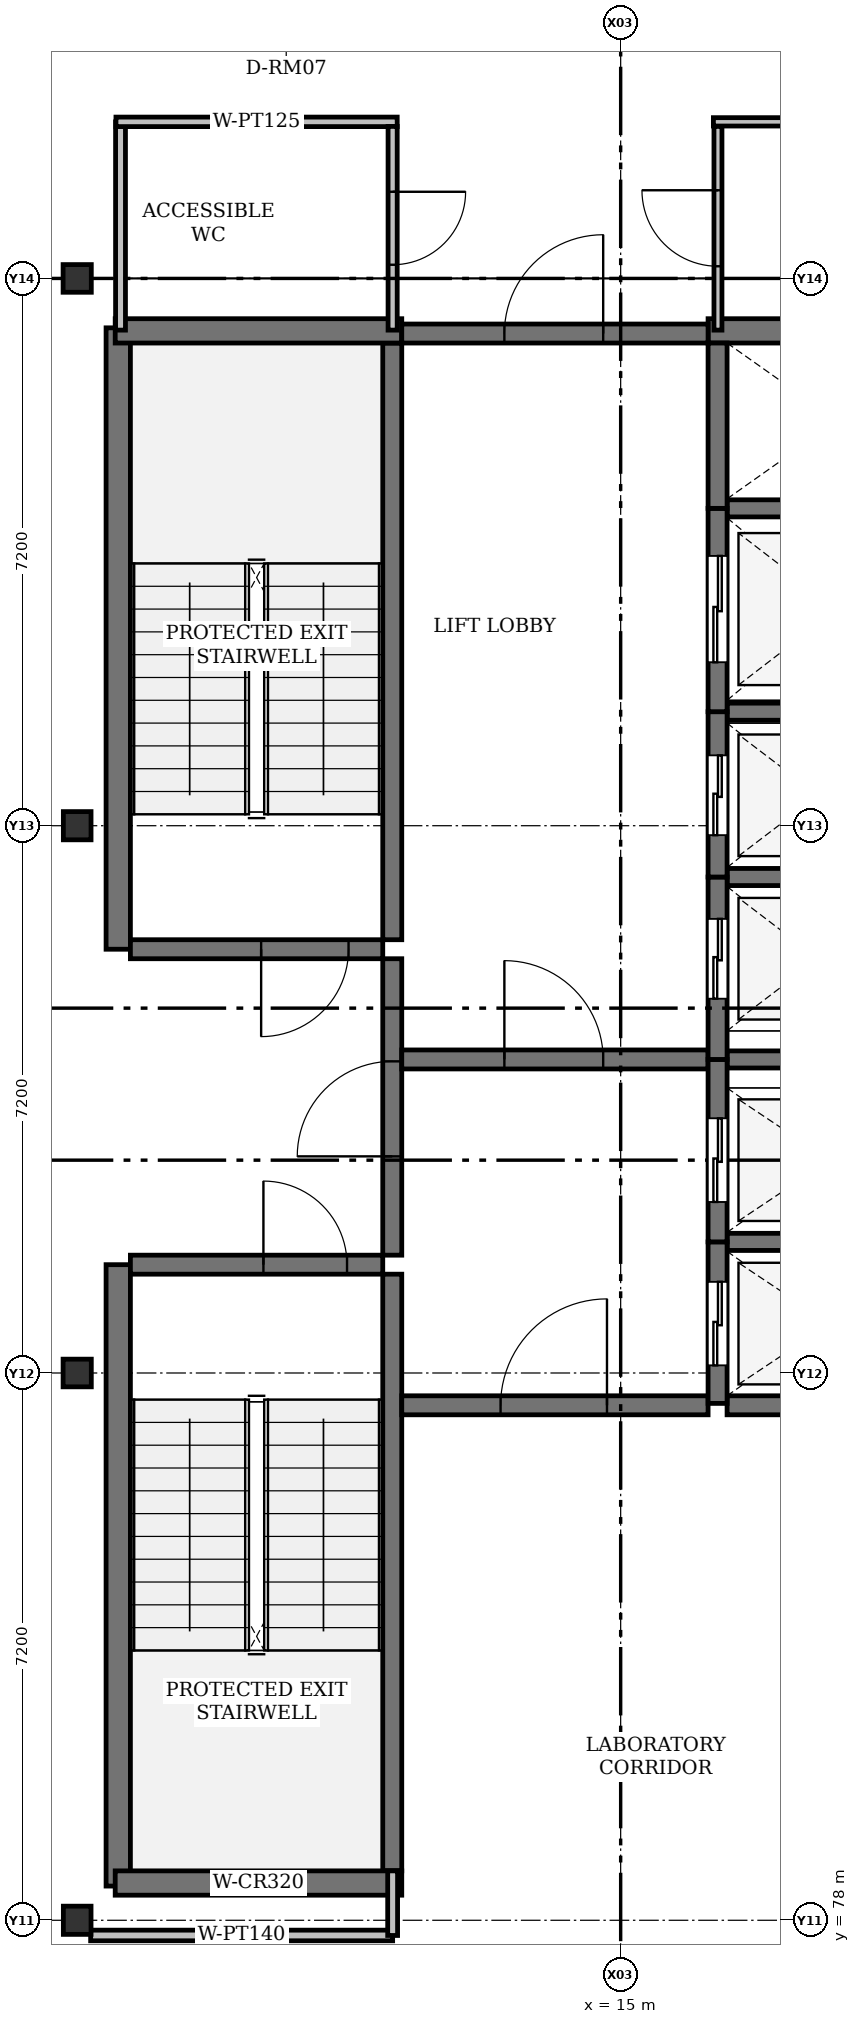
"""IFC4 building model, lengths in metres.
Left out: names, types, materials, properties, quantities, classifications, styles, units other than length and angle.
Written with IfcOpenShell. Run it as: python <this file> out.ifc"""

import sys

from ifc_helpers import new_model, si_unit, direction, frame, frame_2d, origin, origin_2d, place, context, subcontext, project, spatial, rectangle, i_section, extrude, element, fill, save


model = new_model("IFC4")
c1 = context("Model", 3, precision=1e-05, world=origin(), true_north=direction((0.0, 1.0)))
c2 = subcontext(c1, "Body", "Model", "MODEL_VIEW")
j1 = project(units=[si_unit("LENGTHUNIT", "METRE"), si_unit("PLANEANGLEUNIT", "RADIAN")], contexts=[c1])
p1 = place(None, origin())
s1 = spatial("IfcSite", under=j1, at=p1, CompositionType="ELEMENT")
p2 = place(p1, origin())
s2 = spatial("IfcBuilding", under=s1, at=p2, CompositionType="ELEMENT")
p3 = place(p2, frame((0.0, 0.0, 39.3)))
s3 = spatial("IfcBuildingStorey", under=s2, at=p3, CompositionType="ELEMENT", Elevation=39.3)
for number, where, z_axis, x_axis in (
    (1, (7.85, 78.0, 0.0), (0.0, 0.0, 1.0), (0.0, 1.0, 0.0)),
    (2, (7.85, 85.2, 0.0), (0.0, 0.0, 1.0), (1.0, 0.0, 0.0)),
    (3, (7.85, 92.4, 0.0), (0.0, 0.0, 1.0), (0.0, 1.0, 0.0)),
    (4, (7.85, 99.6, 0.0), (0.0, 0.0, 1.0), (1.0, 0.0, 0.0)),
):
    element("IfcColumn", number, at=place(p3, frame(where, z_axis=z_axis, x_axis=x_axis)), inside=s3, PredefinedType="COLUMN", context=c2, shape_type="SweptSolid", body=[
        extrude(i_section(OverallWidth=0.371, OverallDepth=0.364, WebThickness=0.013, FlangeThickness=0.022, FilletRadius=0.015, at=origin_2d()), origin(), (0.0, 0.0, 1.0), 4.2),
    ])
for number, where, z_axis, x_axis in (
    (5, (8.39, 78.45, 0.0), (0.0, 0.0, 1.0), (0.0, 1.0, 0.0)),
    (6, (8.39, 90.775, 0.0), (0.0, 0.0, 1.0), (0.0, 1.0, 0.0)),
):
    element("IfcWall", number, at=place(p3, frame(where, z_axis=z_axis, x_axis=x_axis)), inside=s3, PredefinedType="SHEAR", context=c2, shape_type="SweptSolid", body=[
        extrude(rectangle(XDim=8.175, YDim=0.32, at=frame_2d((4.087, 0.0))), origin(), (0.0, 0.0, 1.0), 4.2),
    ])
for number, where, z_axis, x_axis in (
    (7, (11.995, 78.65, 0.0), (0.0, 0.0, 1.0), (0.0, 1.0, 0.0)),
    (8, (11.995, 90.9, 0.0), (0.0, 0.0, 1.0), (0.0, 1.0, 0.0)),
):
    element("IfcWall", number, at=place(p3, frame(where, z_axis=z_axis, x_axis=x_axis)), inside=s3, PredefinedType="SHEAR", context=c2, shape_type="SweptSolid", body=[
        extrude(rectangle(XDim=7.85, YDim=0.25, at=frame_2d((3.925, 0.0))), origin(), (0.0, 0.0, 1.0), 4.2),
    ])
p4 = place(p3, frame((11.995, 86.75, 0.0), z_axis=(0.0, 0.0, 1.0), x_axis=(0.0, 1.0, 0.0)))
e9 = element("IfcWall", 9, at=p4, inside=s3, PredefinedType="SHEAR", context=c2, shape_type="SweptSolid", body=[
    extrude(rectangle(XDim=3.9, YDim=0.25, at=frame_2d((1.95, 0.0))), origin(), (0.0, 0.0, 1.0), 4.2),
])
p5 = place(p4, frame((1.3, 0.0, 0.0)))
e10 = element("IfcOpeningElement", 10, at=p5, cuts=e9, PredefinedType="OPENING", context=c2, shape_type="SweptSolid", body=[
    extrude(rectangle(XDim=1.25, YDim=2.2, at=frame_2d((0.625, 1.1))), frame((0.0, 0.125, 0.0), z_axis=(0.0, -1.0, 0.0), x_axis=(1.0, 0.0, 0.0)), (0.0, 0.0, 1.0), 0.25),
])
for number, where, z_axis, x_axis in (
    (11, (8.35, 78.49, 0.0), (0.0, 0.0, 1.0), (1.0, 0.0, 0.0)),
    (12, (8.35, 98.91, 0.0), (0.0, 0.0, 1.0), (1.0, 0.0, 0.0)),
):
    element("IfcWall", number, at=place(p3, frame(where, z_axis=z_axis, x_axis=x_axis)), inside=s3, PredefinedType="SHEAR", context=c2, shape_type="SweptSolid", body=[
        extrude(rectangle(XDim=3.77, YDim=0.32, at=frame_2d((1.885, 0.0))), origin(), (0.0, 0.0, 1.0), 4.2),
    ])
p6 = place(p3, frame((16.15, 98.91, 0.0), z_axis=(0.0, 0.0, 1.0), x_axis=(1.0, 0.0, 0.0)))
e13 = element("IfcWall", 13, at=p6, inside=s3, PredefinedType="SHEAR", context=c2, shape_type="SweptSolid", body=[
    extrude(rectangle(XDim=3.3, YDim=0.32, at=frame_2d((1.65, 0.0))), origin(), (0.0, 0.0, 1.0), 4.2),
])
p7 = place(p3, frame((12.12, 98.875, 0.0), z_axis=(0.0, 0.0, 1.0), x_axis=(1.0, 0.0, 0.0)))
e14 = element("IfcWall", 14, at=p7, inside=s3, PredefinedType="SHEAR", context=c2, shape_type="SweptSolid", body=[
    extrude(rectangle(XDim=4.03, YDim=0.25, at=frame_2d((2.015, 0.0))), origin(), (0.0, 0.0, 1.0), 4.2),
])
p8 = place(p7, frame((1.35, 0.0, 0.0)))
e15 = element("IfcOpeningElement", 15, at=p8, cuts=e14, PredefinedType="OPENING", context=c2, shape_type="SweptSolid", body=[
    extrude(rectangle(XDim=1.3, YDim=2.2, at=frame_2d((0.65, 1.1))), frame((0.0, 0.125, 0.0), z_axis=(0.0, -1.0, 0.0), x_axis=(1.0, 0.0, 0.0)), (0.0, 0.0, 1.0), 0.25),
])
p9 = place(p3, frame((8.55, 86.625, 0.0), z_axis=(0.0, 0.0, 1.0), x_axis=(1.0, 0.0, 0.0)))
e16 = element("IfcWall", 16, at=p9, inside=s3, PredefinedType="SHEAR", context=c2, shape_type="SweptSolid", body=[
    extrude(rectangle(XDim=3.32, YDim=0.25, at=frame_2d((1.66, 0.0))), origin(), (0.0, 0.0, 1.0), 4.2),
])
p10 = place(p9, frame((1.75, 0.0, 0.0)))
e17 = element("IfcOpeningElement", 17, at=p10, cuts=e16, PredefinedType="OPENING", context=c2, shape_type="SweptSolid", body=[
    extrude(rectangle(XDim=1.1, YDim=2.15, at=frame_2d((0.55, 1.075))), frame((0.0, 0.125, 0.0), z_axis=(0.0, -1.0, 0.0), x_axis=(1.0, 0.0, 0.0)), (0.0, 0.0, 1.0), 0.25),
])
p11 = place(p3, frame((11.87, 90.775, 0.0), z_axis=(0.0, 0.0, 1.0), x_axis=(-1.0, 0.0, 0.0)))
e18 = element("IfcWall", 18, at=p11, inside=s3, PredefinedType="SHEAR", context=c2, shape_type="SweptSolid", body=[
    extrude(rectangle(XDim=3.32, YDim=0.25, at=frame_2d((1.66, 0.0))), origin(), (0.0, 0.0, 1.0), 4.2),
])
p12 = place(p11, frame((0.45, 0.0, 0.0)))
e19 = element("IfcOpeningElement", 19, at=p12, cuts=e18, PredefinedType="OPENING", context=c2, shape_type="SweptSolid", body=[
    extrude(rectangle(XDim=1.15, YDim=2.15, at=frame_2d((0.575, 1.075))), frame((0.0, 0.125, 0.0), z_axis=(0.0, -1.0, 0.0), x_axis=(1.0, 0.0, 0.0)), (0.0, 0.0, 1.0), 0.25),
])
p13 = place(p3, frame((12.12, 89.325, 0.0), z_axis=(0.0, 0.0, 1.0), x_axis=(1.0, 0.0, 0.0)))
e20 = element("IfcWall", 20, at=p13, inside=s3, PredefinedType="SHEAR", context=c2, shape_type="SweptSolid", body=[
    extrude(rectangle(XDim=4.03, YDim=0.25, at=frame_2d((2.015, 0.0))), origin(), (0.0, 0.0, 1.0), 4.2),
])
p14 = place(p13, frame((1.35, 0.0, 0.0)))
e21 = element("IfcOpeningElement", 21, at=p14, cuts=e20, PredefinedType="OPENING", context=c2, shape_type="SweptSolid", body=[
    extrude(rectangle(XDim=1.3, YDim=2.2, at=frame_2d((0.65, 1.1))), frame((0.0, 0.125, 0.0), z_axis=(0.0, -1.0, 0.0), x_axis=(1.0, 0.0, 0.0)), (0.0, 0.0, 1.0), 0.25),
])
p15 = place(p3, frame((12.12, 84.775, 0.0), z_axis=(0.0, 0.0, 1.0), x_axis=(1.0, 0.0, 0.0)))
e22 = element("IfcWall", 22, at=p15, inside=s3, PredefinedType="SHEAR", context=c2, shape_type="SweptSolid", body=[
    extrude(rectangle(XDim=4.03, YDim=0.25, at=frame_2d((2.015, 0.0))), origin(), (0.0, 0.0, 1.0), 4.2),
])
p16 = place(p15, frame((1.3, 0.0, 0.0)))
e23 = element("IfcOpeningElement", 23, at=p16, cuts=e22, PredefinedType="OPENING", context=c2, shape_type="SweptSolid", body=[
    extrude(rectangle(XDim=1.4, YDim=2.25, at=frame_2d((0.7, 1.125))), frame((0.0, 0.125, 0.0), z_axis=(0.0, -1.0, 0.0), x_axis=(1.0, 0.0, 0.0)), (0.0, 0.0, 1.0), 0.25),
])
p17 = place(p3, frame((16.4, 84.775, 0.0), z_axis=(0.0, 0.0, 1.0), x_axis=(1.0, 0.0, 0.0)))
e24 = element("IfcWall", 24, at=p17, inside=s3, PredefinedType="SHEAR", context=c2, shape_type="SweptSolid", body=[
    extrude(rectangle(XDim=2.95, YDim=0.25, at=frame_2d((1.475, 0.0))), origin(), (0.0, 0.0, 1.0), 4.2),
])
for number, where, z_axis, x_axis in (
    (25, (16.4, 86.925, 0.0), (0.0, 0.0, 1.0), (1.0, 0.0, 0.0)),
    (26, (16.4, 89.325, 0.0), (0.0, 0.0, 1.0), (1.0, 0.0, 0.0)),
    (27, (16.4, 91.725, 0.0), (0.0, 0.0, 1.0), (1.0, 0.0, 0.0)),
    (28, (16.4, 93.9, 0.0), (0.0, 0.0, 1.0), (1.0, 0.0, 0.0)),
    (29, (16.4, 96.575, 0.0), (0.0, 0.0, 1.0), (1.0, 0.0, 0.0)),
):
    element("IfcWall", number, at=place(p3, frame(where, z_axis=z_axis, x_axis=x_axis)), inside=s3, PredefinedType="SHEAR", context=c2, shape_type="SweptSolid", body=[
        extrude(rectangle(XDim=2.8, YDim=0.225, at=frame_2d((1.4, 0.0))), origin(), (0.0, 0.0, 1.0), 4.2),
    ])
p18 = place(p3, frame((16.275, 84.8, 0.0), z_axis=(0.0, 0.0, 1.0), x_axis=(0.0, 1.0, 0.0)))
e30 = element("IfcWall", 30, at=p18, inside=s3, PredefinedType="SHEAR", context=c2, shape_type="SweptSolid", body=[
    extrude(rectangle(XDim=2.125, YDim=0.25, at=frame_2d((1.062, 0.0))), origin(), (0.0, 0.0, 1.0), 4.2),
])
p19 = place(p18, frame((0.5, 0.0, 0.0)))
e31 = element("IfcOpeningElement", 31, at=p19, cuts=e30, PredefinedType="OPENING", context=c2, shape_type="SweptSolid", body=[
    extrude(rectangle(XDim=1.1, YDim=2.15, at=frame_2d((0.55, 1.075))), frame((0.0, 0.125, 0.0), z_axis=(0.0, -1.0, 0.0), x_axis=(1.0, 0.0, 0.0)), (0.0, 0.0, 1.0), 0.25),
])
p20 = place(p3, frame((16.275, 86.925, 0.0), z_axis=(0.0, 0.0, 1.0), x_axis=(0.0, 1.0, 0.0)))
e32 = element("IfcWall", 32, at=p20, inside=s3, PredefinedType="SHEAR", context=c2, shape_type="SweptSolid", body=[
    extrude(rectangle(XDim=2.4, YDim=0.25, at=frame_2d((1.2, 0.0))), origin(), (0.0, 0.0, 1.0), 4.2),
])
p21 = place(p20, frame((0.525, 0.0, 0.0)))
e33 = element("IfcOpeningElement", 33, at=p21, cuts=e32, PredefinedType="OPENING", context=c2, shape_type="SweptSolid", body=[
    extrude(rectangle(XDim=1.1, YDim=2.15, at=frame_2d((0.55, 1.075))), frame((0.0, 0.125, 0.0), z_axis=(0.0, -1.0, 0.0), x_axis=(1.0, 0.0, 0.0)), (0.0, 0.0, 1.0), 0.25),
])
p22 = place(p3, frame((16.275, 89.325, 0.0), z_axis=(0.0, 0.0, 1.0), x_axis=(0.0, 1.0, 0.0)))
e34 = element("IfcWall", 34, at=p22, inside=s3, PredefinedType="SHEAR", context=c2, shape_type="SweptSolid", body=[
    extrude(rectangle(XDim=2.4, YDim=0.25, at=frame_2d((1.2, 0.0))), origin(), (0.0, 0.0, 1.0), 4.2),
])
p23 = place(p22, frame((0.8, 0.0, 0.0)))
e35 = element("IfcOpeningElement", 35, at=p23, cuts=e34, PredefinedType="OPENING", context=c2, shape_type="SweptSolid", body=[
    extrude(rectangle(XDim=1.05, YDim=2.15, at=frame_2d((0.525, 1.075))), frame((0.0, 0.125, 0.0), z_axis=(0.0, -1.0, 0.0), x_axis=(1.0, 0.0, 0.0)), (0.0, 0.0, 1.0), 0.25),
])
p24 = place(p3, frame((16.275, 91.725, 0.0), z_axis=(0.0, 0.0, 1.0), x_axis=(0.0, 1.0, 0.0)))
e36 = element("IfcWall", 36, at=p24, inside=s3, PredefinedType="SHEAR", context=c2, shape_type="SweptSolid", body=[
    extrude(rectangle(XDim=2.175, YDim=0.25, at=frame_2d((1.087, 0.0))), origin(), (0.0, 0.0, 1.0), 4.2),
])
p25 = place(p24, frame((0.55, 0.0, 0.0)))
e37 = element("IfcOpeningElement", 37, at=p25, cuts=e36, PredefinedType="OPENING", context=c2, shape_type="SweptSolid", body=[
    extrude(rectangle(XDim=1.05, YDim=2.15, at=frame_2d((0.525, 1.075))), frame((0.0, 0.125, 0.0), z_axis=(0.0, -1.0, 0.0), x_axis=(1.0, 0.0, 0.0)), (0.0, 0.0, 1.0), 0.25),
])
p26 = place(p3, frame((16.275, 93.9, 0.0), z_axis=(0.0, 0.0, 1.0), x_axis=(0.0, 1.0, 0.0)))
e38 = element("IfcWall", 38, at=p26, inside=s3, PredefinedType="SHEAR", context=c2, shape_type="SweptSolid", body=[
    extrude(rectangle(XDim=2.675, YDim=0.25, at=frame_2d((1.337, 0.0))), origin(), (0.0, 0.0, 1.0), 4.2),
])
p27 = place(p26, frame((0.65, 0.0, 0.0)))
e39 = element("IfcOpeningElement", 39, at=p27, cuts=e38, PredefinedType="OPENING", context=c2, shape_type="SweptSolid", body=[
    extrude(rectangle(XDim=1.4, YDim=2.25, at=frame_2d((0.7, 1.125))), frame((0.0, 0.125, 0.0), z_axis=(0.0, -1.0, 0.0), x_axis=(1.0, 0.0, 0.0)), (0.0, 0.0, 1.0), 0.25),
])
p28 = place(p3, frame((16.275, 96.575, 0.0), z_axis=(0.0, 0.0, 1.0), x_axis=(0.0, 1.0, 0.0)))
e40 = element("IfcWall", 40, at=p28, inside=s3, PredefinedType="SHEAR", context=c2, shape_type="SweptSolid", body=[
    extrude(rectangle(XDim=2.175, YDim=0.25, at=frame_2d((1.087, 0.0))), origin(), (0.0, 0.0, 1.0), 4.2),
])
p29 = place(p3, frame((8.42, 98.92, 0.0), z_axis=(0.0, 0.0, 1.0), x_axis=(0.0, 1.0, 0.0)))
e41 = element("IfcWall", 41, at=p29, inside=s3, PredefinedType="PARTITIONING", context=c2, shape_type="SweptSolid", body=[
    extrude(rectangle(XDim=2.74, YDim=0.13, at=frame_2d((1.37, 0.0))), origin(), (0.0, 0.0, 1.0), 3.451),
])
p30 = place(p3, frame((8.36, 101.66, 0.0), z_axis=(0.0, 0.0, 1.0), x_axis=(1.0, 0.0, 0.0)))
e42 = element("IfcWall", 42, at=p30, inside=s3, PredefinedType="PARTITIONING", context=c2, shape_type="SweptSolid", body=[
    extrude(rectangle(XDim=3.7, YDim=0.125, at=frame_2d((1.85, 0.0))), origin(), (0.0, 0.0, 1.0), 3.95),
])
p31 = place(p3, frame((12.0, 101.6, 0.0), z_axis=(0.0, 0.0, 1.0), x_axis=(0.0, -1.0, 0.0)))
e43 = element("IfcWall", 43, at=p31, inside=s3, PredefinedType="PARTITIONING", context=c2, shape_type="SweptSolid", body=[
    extrude(rectangle(XDim=2.68, YDim=0.12, at=frame_2d((1.34, 0.0))), origin(), (0.0, 0.0, 1.0), 3.451),
])
p32 = place(p31, frame((0.86, 0.0, 0.0)))
e44 = element("IfcOpeningElement", 44, at=p32, cuts=e43, PredefinedType="OPENING", context=c2, shape_type="SweptSolid", body=[
    extrude(rectangle(XDim=0.96, YDim=2.15, at=frame_2d((0.48, 1.075))), frame((0.0, 0.06, 0.0), z_axis=(0.0, -1.0, 0.0), x_axis=(1.0, 0.0, 0.0)), (0.0, 0.0, 1.0), 0.12),
])
p33 = place(p3, frame((19.38, 101.66, 0.0), z_axis=(0.0, 0.0, 1.0), x_axis=(-1.0, 0.0, 0.0)))
e45 = element("IfcWall", 45, at=p33, inside=s3, PredefinedType="PARTITIONING", context=c2, shape_type="SweptSolid", body=[
    extrude(rectangle(XDim=3.16, YDim=0.11, at=frame_2d((1.58, 0.0))), origin(), (0.0, 0.0, 1.0), 3.95),
])
p34 = place(p3, frame((16.28, 98.92, 0.0), z_axis=(0.0, 0.0, 1.0), x_axis=(0.0, 1.0, 0.0)))
e46 = element("IfcWall", 46, at=p34, inside=s3, PredefinedType="PARTITIONING", context=c2, shape_type="SweptSolid", body=[
    extrude(rectangle(XDim=2.68, YDim=0.105, at=frame_2d((1.34, 0.0))), origin(), (0.0, 0.0, 1.0), 3.451),
])
p35 = place(p34, frame((0.84, 0.0, 0.0)))
e47 = element("IfcOpeningElement", 47, at=p35, cuts=e46, PredefinedType="OPENING", context=c2, shape_type="SweptSolid", body=[
    extrude(rectangle(XDim=1.0, YDim=2.15, at=frame_2d((0.5, 1.075))), frame((0.0, 0.052, 0.0), z_axis=(0.0, -1.0, 0.0), x_axis=(1.0, 0.0, 0.0)), (0.0, 0.0, 1.0), 0.105),
])
p36 = place(p3, frame((8.027, 77.8, 0.0), z_axis=(0.0, 0.0, 1.0), x_axis=(1.0, 0.0, 0.0)))
e48 = element("IfcWall", 48, at=p36, inside=s3, PredefinedType="PARTITIONING", context=c2, shape_type="SweptSolid", body=[
    extrude(rectangle(XDim=3.973, YDim=0.14, at=frame_2d((1.986, 0.0))), origin(), (0.0, 0.0, 1.0), 3.451),
])
p37 = place(p3, frame((12.0, 77.8, 0.0), z_axis=(0.0, 0.0, 1.0), x_axis=(0.0, 1.0, 0.0)))
e49 = element("IfcWall", 49, at=p37, inside=s3, PredefinedType="PARTITIONING", context=c2, shape_type="SweptSolid", body=[
    extrude(rectangle(XDim=0.85, YDim=0.13, at=frame_2d((0.425, 0.0))), origin(), (0.0, 0.0, 1.0), 3.451),
])
p38 = place(p5, origin())
e50 = element("IfcDoor", 50, at=p38, inside=s3, OperationType="SINGLE_SWING_LEFT", PredefinedType="DOOR", context=c2, shape_type="SweptSolid", body=[
    extrude(rectangle(XDim=1.25, YDim=2.2, at=frame_2d((0.625, 1.1))), frame((0.0, 0.025, 0.0), z_axis=(0.0, -1.0, 0.0), x_axis=(1.0, 0.0, 0.0)), (0.0, 0.0, 1.0), 0.05),
])
fill(e10, e50)
p39 = place(p8, origin())
e51 = element("IfcDoor", 51, at=p39, inside=s3, OperationType="SINGLE_SWING_RIGHT", PredefinedType="DOOR", context=c2, shape_type="SweptSolid", body=[
    extrude(rectangle(XDim=1.3, YDim=2.2, at=frame_2d((0.65, 1.1))), frame((0.0, 0.025, 0.0), z_axis=(0.0, -1.0, 0.0), x_axis=(1.0, 0.0, 0.0)), (0.0, 0.0, 1.0), 0.05),
])
fill(e15, e51)
p40 = place(p10, origin())
e52 = element("IfcDoor", 52, at=p40, inside=s3, OperationType="SINGLE_SWING_LEFT", PredefinedType="DOOR", context=c2, shape_type="SweptSolid", body=[
    extrude(rectangle(XDim=1.1, YDim=2.15, at=frame_2d((0.55, 1.075))), frame((0.0, 0.025, 0.0), z_axis=(0.0, -1.0, 0.0), x_axis=(1.0, 0.0, 0.0)), (0.0, 0.0, 1.0), 0.05),
])
fill(e17, e52)
p41 = place(p12, origin())
e53 = element("IfcDoor", 53, at=p41, inside=s3, OperationType="SINGLE_SWING_RIGHT", PredefinedType="DOOR", context=c2, shape_type="SweptSolid", body=[
    extrude(rectangle(XDim=1.15, YDim=2.15, at=frame_2d((0.575, 1.075))), frame((0.0, 0.025, 0.0), z_axis=(0.0, -1.0, 0.0), x_axis=(1.0, 0.0, 0.0)), (0.0, 0.0, 1.0), 0.05),
])
fill(e19, e53)
p42 = place(p14, origin())
e54 = element("IfcDoor", 54, at=p42, inside=s3, OperationType="SINGLE_SWING_LEFT", PredefinedType="DOOR", context=c2, shape_type="SweptSolid", body=[
    extrude(rectangle(XDim=1.3, YDim=2.2, at=frame_2d((0.65, 1.1))), frame((0.0, 0.025, 0.0), z_axis=(0.0, -1.0, 0.0), x_axis=(1.0, 0.0, 0.0)), (0.0, 0.0, 1.0), 0.05),
])
fill(e21, e54)
p43 = place(p16, origin())
e55 = element("IfcDoor", 55, at=p43, inside=s3, OperationType="SINGLE_SWING_RIGHT", PredefinedType="DOOR", context=c2, shape_type="SweptSolid", body=[
    extrude(rectangle(XDim=1.4, YDim=2.25, at=frame_2d((0.7, 1.125))), frame((0.0, 0.025, 0.0), z_axis=(0.0, -1.0, 0.0), x_axis=(1.0, 0.0, 0.0)), (0.0, 0.0, 1.0), 0.05),
])
fill(e23, e55)
p44 = place(p19, origin())
e56 = element("IfcDoor", 56, at=p44, inside=s3, OperationType="SLIDING_TO_LEFT", PredefinedType="DOOR", context=c2, shape_type="SweptSolid", body=[
    extrude(rectangle(XDim=1.1, YDim=2.15, at=frame_2d((0.55, 1.075))), frame((0.0, 0.025, 0.0), z_axis=(0.0, -1.0, 0.0), x_axis=(1.0, 0.0, 0.0)), (0.0, 0.0, 1.0), 0.05),
])
fill(e31, e56)
p45 = place(p21, origin())
e57 = element("IfcDoor", 57, at=p45, inside=s3, OperationType="SLIDING_TO_LEFT", PredefinedType="DOOR", context=c2, shape_type="SweptSolid", body=[
    extrude(rectangle(XDim=1.1, YDim=2.15, at=frame_2d((0.55, 1.075))), frame((0.0, 0.025, 0.0), z_axis=(0.0, -1.0, 0.0), x_axis=(1.0, 0.0, 0.0)), (0.0, 0.0, 1.0), 0.05),
])
fill(e33, e57)
p46 = place(p23, origin())
e58 = element("IfcDoor", 58, at=p46, inside=s3, OperationType="SLIDING_TO_LEFT", PredefinedType="DOOR", context=c2, shape_type="SweptSolid", body=[
    extrude(rectangle(XDim=1.05, YDim=2.15, at=frame_2d((0.525, 1.075))), frame((0.0, 0.025, 0.0), z_axis=(0.0, -1.0, 0.0), x_axis=(1.0, 0.0, 0.0)), (0.0, 0.0, 1.0), 0.05),
])
fill(e35, e58)
p47 = place(p25, origin())
e59 = element("IfcDoor", 59, at=p47, inside=s3, OperationType="SLIDING_TO_LEFT", PredefinedType="DOOR", context=c2, shape_type="SweptSolid", body=[
    extrude(rectangle(XDim=1.05, YDim=2.15, at=frame_2d((0.525, 1.075))), frame((0.0, 0.025, 0.0), z_axis=(0.0, -1.0, 0.0), x_axis=(1.0, 0.0, 0.0)), (0.0, 0.0, 1.0), 0.05),
])
fill(e37, e59)
p48 = place(p27, origin())
e60 = element("IfcDoor", 60, at=p48, inside=s3, OperationType="SLIDING_TO_LEFT", PredefinedType="DOOR", context=c2, shape_type="SweptSolid", body=[
    extrude(rectangle(XDim=1.4, YDim=2.25, at=frame_2d((0.7, 1.125))), frame((0.0, 0.025, 0.0), z_axis=(0.0, -1.0, 0.0), x_axis=(1.0, 0.0, 0.0)), (0.0, 0.0, 1.0), 0.05),
])
fill(e39, e60)
p49 = place(p32, origin())
e61 = element("IfcDoor", 61, at=p49, inside=s3, OperationType="SINGLE_SWING_LEFT", PredefinedType="DOOR", context=c2, shape_type="SweptSolid", body=[
    extrude(rectangle(XDim=0.96, YDim=2.15, at=frame_2d((0.48, 1.075))), frame((0.0, 0.025, 0.0), z_axis=(0.0, -1.0, 0.0), x_axis=(1.0, 0.0, 0.0)), (0.0, 0.0, 1.0), 0.05),
])
fill(e44, e61)
p50 = place(p35, origin())
e62 = element("IfcDoor", 62, at=p50, inside=s3, OperationType="SINGLE_SWING_RIGHT", PredefinedType="DOOR", context=c2, shape_type="SweptSolid", body=[
    extrude(rectangle(XDim=1.0, YDim=2.15, at=frame_2d((0.5, 1.075))), frame((0.0, 0.025, 0.0), z_axis=(0.0, -1.0, 0.0), x_axis=(1.0, 0.0, 0.0)), (0.0, 0.0, 1.0), 0.05),
])
fill(e47, e62)
save(model, sys.argv[1])
